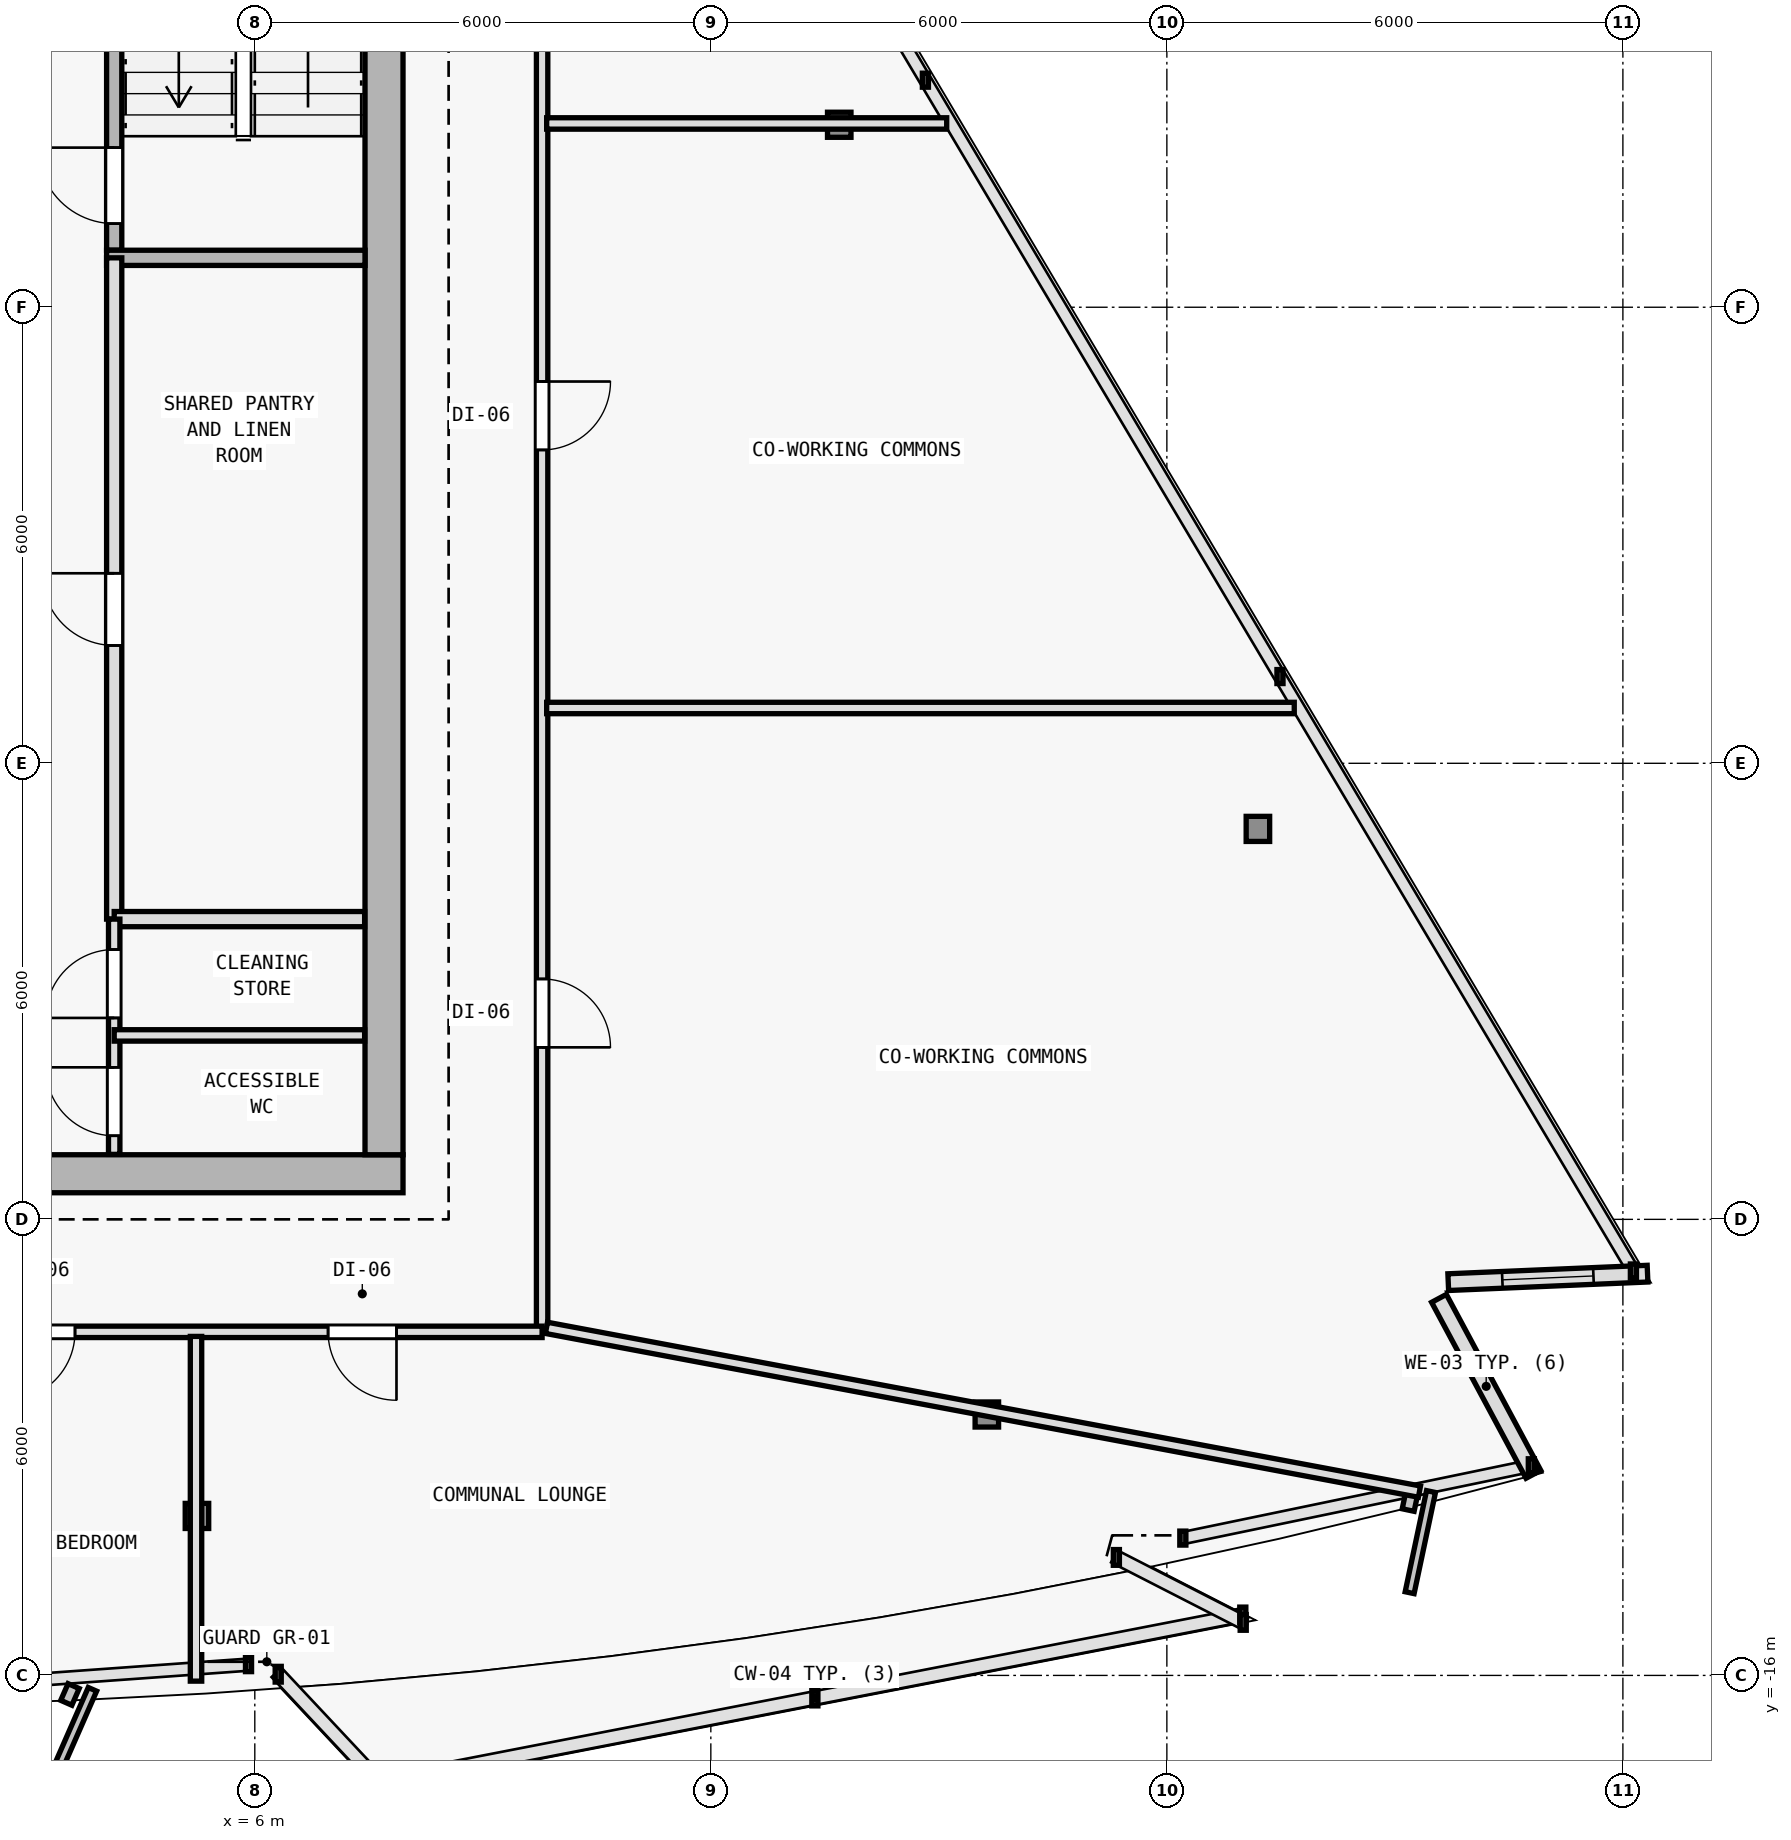
"""IFC4 building model, lengths in metres.
Left out: names, types, materials, properties, quantities, classifications, styles, units other than length and angle.
Written with IfcOpenShell. Run it as: python <this file> out.ifc"""

import sys

from ifc_helpers import new_model, si_unit, direction, frame, frame_2d, origin, origin_2d, place, context, subcontext, project, spatial, rectangle, i_section, extrude, element, fill, save


model = new_model("IFC4")
c1 = context("Model", 3, precision=1e-05, world=origin(), true_north=direction((0.0, 1.0)))
c2 = subcontext(c1, "Body", "Model", "MODEL_VIEW")
j1 = project(units=[si_unit("LENGTHUNIT", "METRE"), si_unit("PLANEANGLEUNIT", "RADIAN")], contexts=[c1])
p1 = place(None, origin())
s1 = spatial("IfcSite", under=j1, at=p1, CompositionType="ELEMENT")
p2 = place(p1, origin())
s2 = spatial("IfcBuilding", under=s1, at=p2, CompositionType="ELEMENT")
p3 = place(p2, frame((0.0, 0.0, 265.2)))
s3 = spatial("IfcBuildingStorey", under=s2, at=p3, CompositionType="ELEMENT", Elevation=265.2)
for number, where, z_axis, x_axis in (
    (1, (7.7, -9.4, 0.0), (0.0, 0.0, 1.0), (1.0, 0.0, 0.0)),
    (2, (7.7, 0.4, 0.0), (0.0, 0.0, 1.0), (1.0, 0.0, 0.0)),
):
    element("IfcColumn", number, at=place(p3, frame(where, z_axis=z_axis, x_axis=x_axis)), inside=s3, PredefinedType="COLUMN", context=c2, shape_type="SweptSolid", body=[
        extrude(i_section(OverallWidth=0.374, OverallDepth=0.372, WebThickness=0.012, FlangeThickness=0.02, FilletRadius=0.015, at=origin_2d()), origin(), (0.0, 0.0, 1.0), 3.6),
    ])
p4 = place(p3, frame((5.239, -13.902, 0.006), z_axis=(-0.006934288159, 0.035283289748, 0.999353293441), x_axis=(-0.981229659911, -0.192842823335, 0.0)))
e3 = element("IfcColumn", 3, at=p4, inside=s3, PredefinedType="COLUMN", context=c2, shape_type="SweptSolid", body=[
    extrude(i_section(OverallWidth=0.309, OverallDepth=0.33, WebThickness=0.011, FlangeThickness=0.019, FilletRadius=0.027, at=origin_2d()), origin(), (0.0, 0.0, 1.0), 3.591),
])
p5 = place(p3, frame((15.632, -12.567, 0.006), z_axis=(-0.020596292833, 0.033511459955, 0.999226087917), x_axis=(-0.851954850327, -0.523615252838, 0.0)))
e4 = element("IfcColumn", 4, at=p5, inside=s3, PredefinedType="COLUMN", context=c2, shape_type="SweptSolid", body=[
    extrude(i_section(OverallWidth=0.309, OverallDepth=0.33, WebThickness=0.011, FlangeThickness=0.019, FilletRadius=0.027, at=origin_2d()), origin(), (0.0, 0.0, 1.0), 3.592),
])
p6 = place(p3, frame((19.198, -4.863, 0.006), z_axis=(-0.026107436898, 0.021620221181, 0.999425318758), x_axis=(-0.637813971185, -0.770190455771, 0.0)))
e5 = element("IfcColumn", 5, at=p6, inside=s3, PredefinedType="COLUMN", context=c2, shape_type="SweptSolid", body=[
    extrude(i_section(OverallWidth=0.309, OverallDepth=0.33, WebThickness=0.011, FlangeThickness=0.019, FilletRadius=0.027, at=origin_2d()), origin(), (0.0, 0.0, 1.0), 3.591),
])
p7 = place(p3, frame((13.689, 4.401, 0.006), z_axis=(-0.018907326549, 0.00952167524, 0.999775900241), x_axis=(-0.449781931574, -0.893138406984, 0.0)))
e6 = element("IfcColumn", 6, at=p7, inside=s3, PredefinedType="COLUMN", context=c2, shape_type="SweptSolid", body=[
    extrude(i_section(OverallWidth=0.309, OverallDepth=0.33, WebThickness=0.011, FlangeThickness=0.019, FilletRadius=0.027, at=origin_2d()), origin(), (0.0, 0.0, 1.0), 3.59),
])
p8 = place(p3, frame((21.581, -11.04, 0.0), z_axis=(0.0, 0.0, 1.0), x_axis=(0.472791303324, -0.881174434208, 0.0)))
e7 = element("IfcWall", 7, at=p8, inside=s3, PredefinedType="SOLIDWALL", context=c2, shape_type="SweptSolid", body=[
    extrude(rectangle(XDim=2.627, YDim=0.22, at=frame_2d((1.313, 0.0))), origin(), (0.0, 0.0, 1.0), 3.35),
])
p9 = place(p3, frame((24.324, -10.714, 0.0), z_axis=(0.0, 0.0, 1.0), x_axis=(-0.999095924753, -0.042512740932, 0.0)))
e8 = element("IfcWall", 8, at=p9, inside=s3, PredefinedType="SOLIDWALL", context=c2, shape_type="SweptSolid", body=[
    extrude(rectangle(XDim=2.625, YDim=0.22, at=frame_2d((1.312, 0.0))), origin(), (0.0, 0.0, 1.0), 3.35),
])
p10 = place(p9, frame((0.712, 0.0, 0.62)))
e9 = element("IfcOpeningElement", 9, at=p10, cuts=e8, PredefinedType="OPENING", context=c2, shape_type="SweptSolid", body=[
    extrude(rectangle(XDim=1.2, YDim=1.8, at=frame_2d((0.6, 0.9))), frame((0.0, 0.12, 0.0), z_axis=(0.0, -1.0, 0.0), x_axis=(1.0, 0.0, 0.0)), (0.0, 0.0, 1.0), 0.24),
])
p11 = place(p3, frame((-7.95, -9.4, 0.0), z_axis=(0.0, 0.0, 1.0), x_axis=(1.0, 0.0, 0.0)))
e10 = element("IfcWall", 10, at=p11, inside=s3, PredefinedType="SHEAR", context=c2, shape_type="SweptSolid", body=[
    extrude(rectangle(XDim=15.9, YDim=0.5, at=frame_2d((7.95, 0.0))), origin(), (0.0, 0.0, 1.0), 3.35),
])
p12 = place(p11, frame((9.6, 0.0, 0.0)))
e11 = element("IfcOpeningElement", 11, at=p12, cuts=e10, PredefinedType="OPENING", context=c2, shape_type="SweptSolid", body=[
    extrude(rectangle(XDim=1.5, YDim=2.2, at=frame_2d((0.75, 1.1))), frame((0.0, 0.26, 0.0), z_axis=(0.0, -1.0, 0.0), x_axis=(1.0, 0.0, 0.0)), (0.0, 0.0, 1.0), 0.52),
])
p13 = place(p3, frame((7.7, 9.95, 0.0), z_axis=(0.0, 0.0, 1.0), x_axis=(0.0, -1.0, 0.0)))
e12 = element("IfcWall", 12, at=p13, inside=s3, PredefinedType="SHEAR", context=c2, shape_type="SweptSolid", body=[
    extrude(rectangle(XDim=19.1, YDim=0.5, at=frame_2d((9.55, 0.0))), origin(), (0.0, 0.0, 1.0), 3.35),
])
p14 = place(p3, frame((4.15, 2.75, 0.0), z_axis=(0.0, 0.0, 1.0), x_axis=(0.0, 1.0, 0.0)))
e13 = element("IfcWall", 13, at=p14, inside=s3, PredefinedType="SOLIDWALL", context=c2, shape_type="SweptSolid", body=[
    extrude(rectangle(XDim=7.2, YDim=0.2, at=frame_2d((3.6, 0.0))), origin(), (0.0, 0.0, 1.0), 3.35),
])
p15 = place(p14, frame((0.35, 0.0, 0.0)))
e14 = element("IfcOpeningElement", 14, at=p15, cuts=e13, PredefinedType="OPENING", context=c2, shape_type="SweptSolid", body=[
    extrude(rectangle(XDim=1.0, YDim=2.15, at=frame_2d((0.5, 1.075))), frame((0.0, 0.11, 0.0), z_axis=(0.0, -1.0, 0.0), x_axis=(1.0, 0.0, 0.0)), (0.0, 0.0, 1.0), 0.22),
])
p16 = place(p3, frame((4.05, 2.65, 0.0), z_axis=(0.0, 0.0, 1.0), x_axis=(1.0, 0.0, 0.0)))
e15 = element("IfcWall", 15, at=p16, inside=s3, PredefinedType="SOLIDWALL", context=c2, shape_type="SweptSolid", body=[
    extrude(rectangle(XDim=3.4, YDim=0.2, at=frame_2d((1.7, 0.0))), origin(), (0.0, 0.0, 1.0), 3.35),
])
p17 = place(p3, frame((4.15, -6.05, 0.0), z_axis=(0.0, 0.0, 1.0), x_axis=(0.0, 1.0, 0.0)))
e16 = element("IfcWall", 16, at=p17, inside=s3, PredefinedType="SOLIDWALL", context=c2, shape_type="SweptSolid", body=[
    extrude(rectangle(XDim=8.7, YDim=0.2, at=frame_2d((4.35, 0.0))), origin(), (0.0, 0.0, 1.0), 3.35),
])
p18 = place(p17, frame((3.6, 0.0, 0.0)))
e17 = element("IfcOpeningElement", 17, at=p18, cuts=e16, PredefinedType="OPENING", context=c2, shape_type="SweptSolid", body=[
    extrude(rectangle(XDim=0.95, YDim=2.1, at=frame_2d((0.475, 1.05))), frame((0.0, 0.11, 0.0), z_axis=(0.0, -1.0, 0.0), x_axis=(1.0, 0.0, 0.0)), (0.0, 0.0, 1.0), 0.22),
])
p19 = place(p3, frame((4.15, -6.05, 0.0), z_axis=(0.0, 0.0, 1.0), x_axis=(1.0, 0.0, 0.0)))
e18 = element("IfcWall", 18, at=p19, inside=s3, PredefinedType="SOLIDWALL", context=c2, shape_type="SweptSolid", body=[
    extrude(rectangle(XDim=3.295, YDim=0.2, at=frame_2d((1.647, 0.0))), origin(), (0.0, 0.0, 1.0), 3.35),
])
p20 = place(p3, frame((4.15, -9.145, 0.0), z_axis=(0.0, 0.0, 1.0), x_axis=(0.0, 1.0, 0.0)))
e19 = element("IfcWall", 19, at=p20, inside=s3, PredefinedType="PARTITIONING", context=c2, shape_type="SweptSolid", body=[
    extrude(rectangle(XDim=3.095, YDim=0.15, at=frame_2d((1.547, 0.0))), origin(), (0.0, 0.0, 1.0), 3.35),
])
p21 = place(p20, frame((0.245, 0.0, 0.0)))
e20 = element("IfcOpeningElement", 20, at=p21, cuts=e19, PredefinedType="OPENING", context=c2, shape_type="SweptSolid", body=[
    extrude(rectangle(XDim=0.9, YDim=2.1, at=frame_2d((0.45, 1.05))), frame((0.0, 0.085, 0.0), z_axis=(0.0, -1.0, 0.0), x_axis=(1.0, 0.0, 0.0)), (0.0, 0.0, 1.0), 0.17),
])
p22 = place(p20, frame((1.795, 0.0, 0.0)))
e21 = element("IfcOpeningElement", 21, at=p22, cuts=e19, PredefinedType="OPENING", context=c2, shape_type="SweptSolid", body=[
    extrude(rectangle(XDim=0.9, YDim=2.1, at=frame_2d((0.45, 1.05))), frame((0.0, 0.085, 0.0), z_axis=(0.0, -1.0, 0.0), x_axis=(1.0, 0.0, 0.0)), (0.0, 0.0, 1.0), 0.17),
])
p23 = place(p3, frame((4.15, -7.58, 0.0), z_axis=(0.0, 0.0, 1.0), x_axis=(1.0, 0.0, 0.0)))
e22 = element("IfcWall", 22, at=p23, inside=s3, PredefinedType="PARTITIONING", context=c2, shape_type="SweptSolid", body=[
    extrude(rectangle(XDim=3.295, YDim=0.15, at=frame_2d((1.647, 0.0))), origin(), (0.0, 0.0, 1.0), 3.35),
])
p24 = place(p3, frame((9.78, 8.226, 0.0), z_axis=(0.0, 0.0, 1.0), x_axis=(0.0, -1.0, 0.0)))
e23 = element("IfcWall", 23, at=p24, inside=s3, PredefinedType="PARTITIONING", context=c2, shape_type="SweptSolid", body=[
    extrude(rectangle(XDim=19.706, YDim=0.15, at=frame_2d((9.853, 0.0))), origin(), (0.0, 0.0, 1.0), 2.825),
])
p25 = place(p24, frame((15.063, 0.0, 0.0)))
e24 = element("IfcOpeningElement", 24, at=p25, cuts=e23, PredefinedType="OPENING", context=c2, shape_type="SweptSolid", body=[
    extrude(rectangle(XDim=0.9, YDim=2.1, at=frame_2d((0.45, 1.05))), frame((0.0, 0.085, 0.0), z_axis=(0.0, -1.0, 0.0), x_axis=(1.0, 0.0, 0.0)), (0.0, 0.0, 1.0), 0.17),
])
p26 = place(p24, frame((7.203, 0.0, 0.0)))
e25 = element("IfcOpeningElement", 25, at=p26, cuts=e23, PredefinedType="OPENING", context=c2, shape_type="SweptSolid", body=[
    extrude(rectangle(XDim=0.9, YDim=2.1, at=frame_2d((0.45, 1.05))), frame((0.0, 0.085, 0.0), z_axis=(0.0, -1.0, 0.0), x_axis=(1.0, 0.0, 0.0)), (0.0, 0.0, 1.0), 0.17),
])
p27 = place(p3, frame((9.78, -11.48, 0.0), z_axis=(0.0, 0.0, 1.0), x_axis=(-1.0, 0.0, 0.0)))
e26 = element("IfcWall", 26, at=p27, inside=s3, PredefinedType="PARTITIONING", context=c2, shape_type="SweptSolid", body=[
    extrude(rectangle(XDim=19.56, YDim=0.15, at=frame_2d((9.78, 0.0))), origin(), (0.0, 0.0, 1.0), 2.775),
])
p28 = place(p27, frame((16.744, 0.0, 0.0)))
e27 = element("IfcOpeningElement", 27, at=p28, cuts=e26, PredefinedType="OPENING", context=c2, shape_type="SweptSolid", body=[
    extrude(rectangle(XDim=0.9, YDim=2.1, at=frame_2d((0.45, 1.05))), frame((0.0, 0.085, 0.0), z_axis=(0.0, -1.0, 0.0), x_axis=(1.0, 0.0, 0.0)), (0.0, 0.0, 1.0), 0.17),
])
p29 = place(p27, frame((12.964, 0.0, 0.0)))
e28 = element("IfcOpeningElement", 28, at=p29, cuts=e26, PredefinedType="OPENING", context=c2, shape_type="SweptSolid", body=[
    extrude(rectangle(XDim=0.9, YDim=2.1, at=frame_2d((0.45, 1.05))), frame((0.0, 0.085, 0.0), z_axis=(0.0, -1.0, 0.0), x_axis=(1.0, 0.0, 0.0)), (0.0, 0.0, 1.0), 0.17),
])
p30 = place(p27, frame((9.78, 0.0, 0.0)))
e29 = element("IfcOpeningElement", 29, at=p30, cuts=e26, PredefinedType="OPENING", context=c2, shape_type="SweptSolid", body=[
    extrude(rectangle(XDim=0.9, YDim=2.1, at=frame_2d((0.45, 1.05))), frame((0.0, 0.085, 0.0), z_axis=(0.0, -1.0, 0.0), x_axis=(1.0, 0.0, 0.0)), (0.0, 0.0, 1.0), 0.17),
])
p31 = place(p27, frame((6.146, 0.0, 0.0)))
e30 = element("IfcOpeningElement", 30, at=p31, cuts=e26, PredefinedType="OPENING", context=c2, shape_type="SweptSolid", body=[
    extrude(rectangle(XDim=0.9, YDim=2.1, at=frame_2d((0.45, 1.05))), frame((0.0, 0.085, 0.0), z_axis=(0.0, -1.0, 0.0), x_axis=(1.0, 0.0, 0.0)), (0.0, 0.0, 1.0), 0.17),
])
p32 = place(p27, frame((1.916, 0.0, 0.0)))
e31 = element("IfcOpeningElement", 31, at=p32, cuts=e26, PredefinedType="OPENING", context=c2, shape_type="SweptSolid", body=[
    extrude(rectangle(XDim=0.9, YDim=2.1, at=frame_2d((0.45, 1.05))), frame((0.0, 0.085, 0.0), z_axis=(0.0, -1.0, 0.0), x_axis=(1.0, 0.0, 0.0)), (0.0, 0.0, 1.0), 0.17),
])
p33 = place(p3, frame((5.227, -11.54, 0.0), z_axis=(0.0, 0.0, 1.0), x_axis=(0.0, -1.0, 0.0)))
e32 = element("IfcWall", 32, at=p33, inside=s3, PredefinedType="PARTITIONING", context=c2, shape_type="SweptSolid", body=[
    extrude(rectangle(XDim=4.535, YDim=0.15, at=frame_2d((2.268, 0.0))), origin(), (0.0, 0.0, 1.0), 2.825),
])
p34 = place(p3, frame((9.837, -11.427, 0.0), z_axis=(0.0, 0.0, 1.0), x_axis=(0.982858230515, -0.184362953733, 0.0)))
e33 = element("IfcWall", 33, at=p34, inside=s3, PredefinedType="PARTITIONING", context=c2, shape_type="SweptSolid", body=[
    extrude(rectangle(XDim=11.687, YDim=0.15, at=frame_2d((5.843, 0.0))), origin(), (0.0, 0.0, 1.0), 2.825),
])
p35 = place(p3, frame((9.84, 4.418, 0.0), z_axis=(0.0, 0.0, 1.0), x_axis=(1.0, 0.0, 0.0)))
e34 = element("IfcWall", 34, at=p35, inside=s3, PredefinedType="PARTITIONING", context=c2, shape_type="SweptSolid", body=[
    extrude(rectangle(XDim=5.263, YDim=0.15, at=frame_2d((2.632, 0.0))), origin(), (0.0, 0.0, 1.0), 2.965),
])
p36 = place(p3, frame((9.84, -3.272, 0.0), z_axis=(0.0, 0.0, 1.0), x_axis=(1.0, 0.0, 0.0)))
e35 = element("IfcWall", 35, at=p36, inside=s3, PredefinedType="PARTITIONING", context=c2, shape_type="SweptSolid", body=[
    extrude(rectangle(XDim=9.836, YDim=0.15, at=frame_2d((4.918, 0.0))), origin(), (0.0, 0.0, 1.0), 2.925),
])
p37 = place(p10, origin())
e36 = element("IfcWindow", 36, at=p37, inside=s3, PartitioningType="SINGLE_PANEL", PredefinedType="WINDOW", context=c2, shape_type="SweptSolid", body=[
    extrude(rectangle(XDim=1.2, YDim=1.8, at=frame_2d((0.6, 0.9))), frame((0.0, 0.03, 0.0), z_axis=(0.0, -1.0, 0.0), x_axis=(1.0, 0.0, 0.0)), (0.0, 0.0, 1.0), 0.06),
])
fill(e9, e36)
p38 = place(p15, origin())
e37 = element("IfcDoor", 37, at=p38, inside=s3, OperationType="SINGLE_SWING_RIGHT", PredefinedType="DOOR", context=c2, shape_type="SweptSolid", body=[
    extrude(rectangle(XDim=1.0, YDim=2.15, at=frame_2d((0.5, 1.075))), frame((0.0, 0.025, 0.0), z_axis=(0.0, -1.0, 0.0), x_axis=(1.0, 0.0, 0.0)), (0.0, 0.0, 1.0), 0.05),
])
fill(e14, e37)
p39 = place(p18, origin())
e38 = element("IfcDoor", 38, at=p39, inside=s3, OperationType="SINGLE_SWING_RIGHT", PredefinedType="DOOR", context=c2, shape_type="SweptSolid", body=[
    extrude(rectangle(XDim=0.95, YDim=2.1, at=frame_2d((0.475, 1.05))), frame((0.0, 0.025, 0.0), z_axis=(0.0, -1.0, 0.0), x_axis=(1.0, 0.0, 0.0)), (0.0, 0.0, 1.0), 0.05),
])
fill(e17, e38)
p40 = place(p21, origin())
e39 = element("IfcDoor", 39, at=p40, inside=s3, OperationType="SINGLE_SWING_RIGHT", PredefinedType="DOOR", context=c2, shape_type="SweptSolid", body=[
    extrude(rectangle(XDim=0.9, YDim=2.1, at=frame_2d((0.45, 1.05))), frame((0.0, 0.025, 0.0), z_axis=(0.0, -1.0, 0.0), x_axis=(1.0, 0.0, 0.0)), (0.0, 0.0, 1.0), 0.05),
])
fill(e20, e39)
p41 = place(p22, origin())
e40 = element("IfcDoor", 40, at=p41, inside=s3, OperationType="SINGLE_SWING_LEFT", PredefinedType="DOOR", context=c2, shape_type="SweptSolid", body=[
    extrude(rectangle(XDim=0.9, YDim=2.1, at=frame_2d((0.45, 1.05))), frame((0.0, 0.025, 0.0), z_axis=(0.0, -1.0, 0.0), x_axis=(1.0, 0.0, 0.0)), (0.0, 0.0, 1.0), 0.05),
])
fill(e21, e40)
p42 = place(p31, origin())
e41 = element("IfcDoor", 41, at=p42, inside=s3, OperationType="SINGLE_SWING_RIGHT", PredefinedType="DOOR", context=c2, shape_type="SweptSolid", body=[
    extrude(rectangle(XDim=0.9, YDim=2.1, at=frame_2d((0.45, 1.05))), frame((0.0, 0.025, 0.0), z_axis=(0.0, -1.0, 0.0), x_axis=(1.0, 0.0, 0.0)), (0.0, 0.0, 1.0), 0.05),
])
fill(e30, e41)
p43 = place(p32, origin())
e42 = element("IfcDoor", 42, at=p43, inside=s3, OperationType="SINGLE_SWING_LEFT", PredefinedType="DOOR", context=c2, shape_type="SweptSolid", body=[
    extrude(rectangle(XDim=0.9, YDim=2.1, at=frame_2d((0.45, 1.05))), frame((0.0, 0.025, 0.0), z_axis=(0.0, -1.0, 0.0), x_axis=(1.0, 0.0, 0.0)), (0.0, 0.0, 1.0), 0.05),
])
fill(e31, e42)
p44 = place(p25, origin())
e43 = element("IfcDoor", 43, at=p44, inside=s3, OperationType="SINGLE_SWING_RIGHT", PredefinedType="DOOR", context=c2, shape_type="SweptSolid", body=[
    extrude(rectangle(XDim=0.9, YDim=2.1, at=frame_2d((0.45, 1.05))), frame((0.0, 0.025, 0.0), z_axis=(0.0, -1.0, 0.0), x_axis=(1.0, 0.0, 0.0)), (0.0, 0.0, 1.0), 0.05),
])
fill(e24, e43)
p45 = place(p26, origin())
e44 = element("IfcDoor", 44, at=p45, inside=s3, OperationType="SINGLE_SWING_LEFT", PredefinedType="DOOR", context=c2, shape_type="SweptSolid", body=[
    extrude(rectangle(XDim=0.9, YDim=2.1, at=frame_2d((0.45, 1.05))), frame((0.0, 0.025, 0.0), z_axis=(0.0, -1.0, 0.0), x_axis=(1.0, 0.0, 0.0)), (0.0, 0.0, 1.0), 0.05),
])
fill(e25, e44)
save(model, sys.argv[1])
